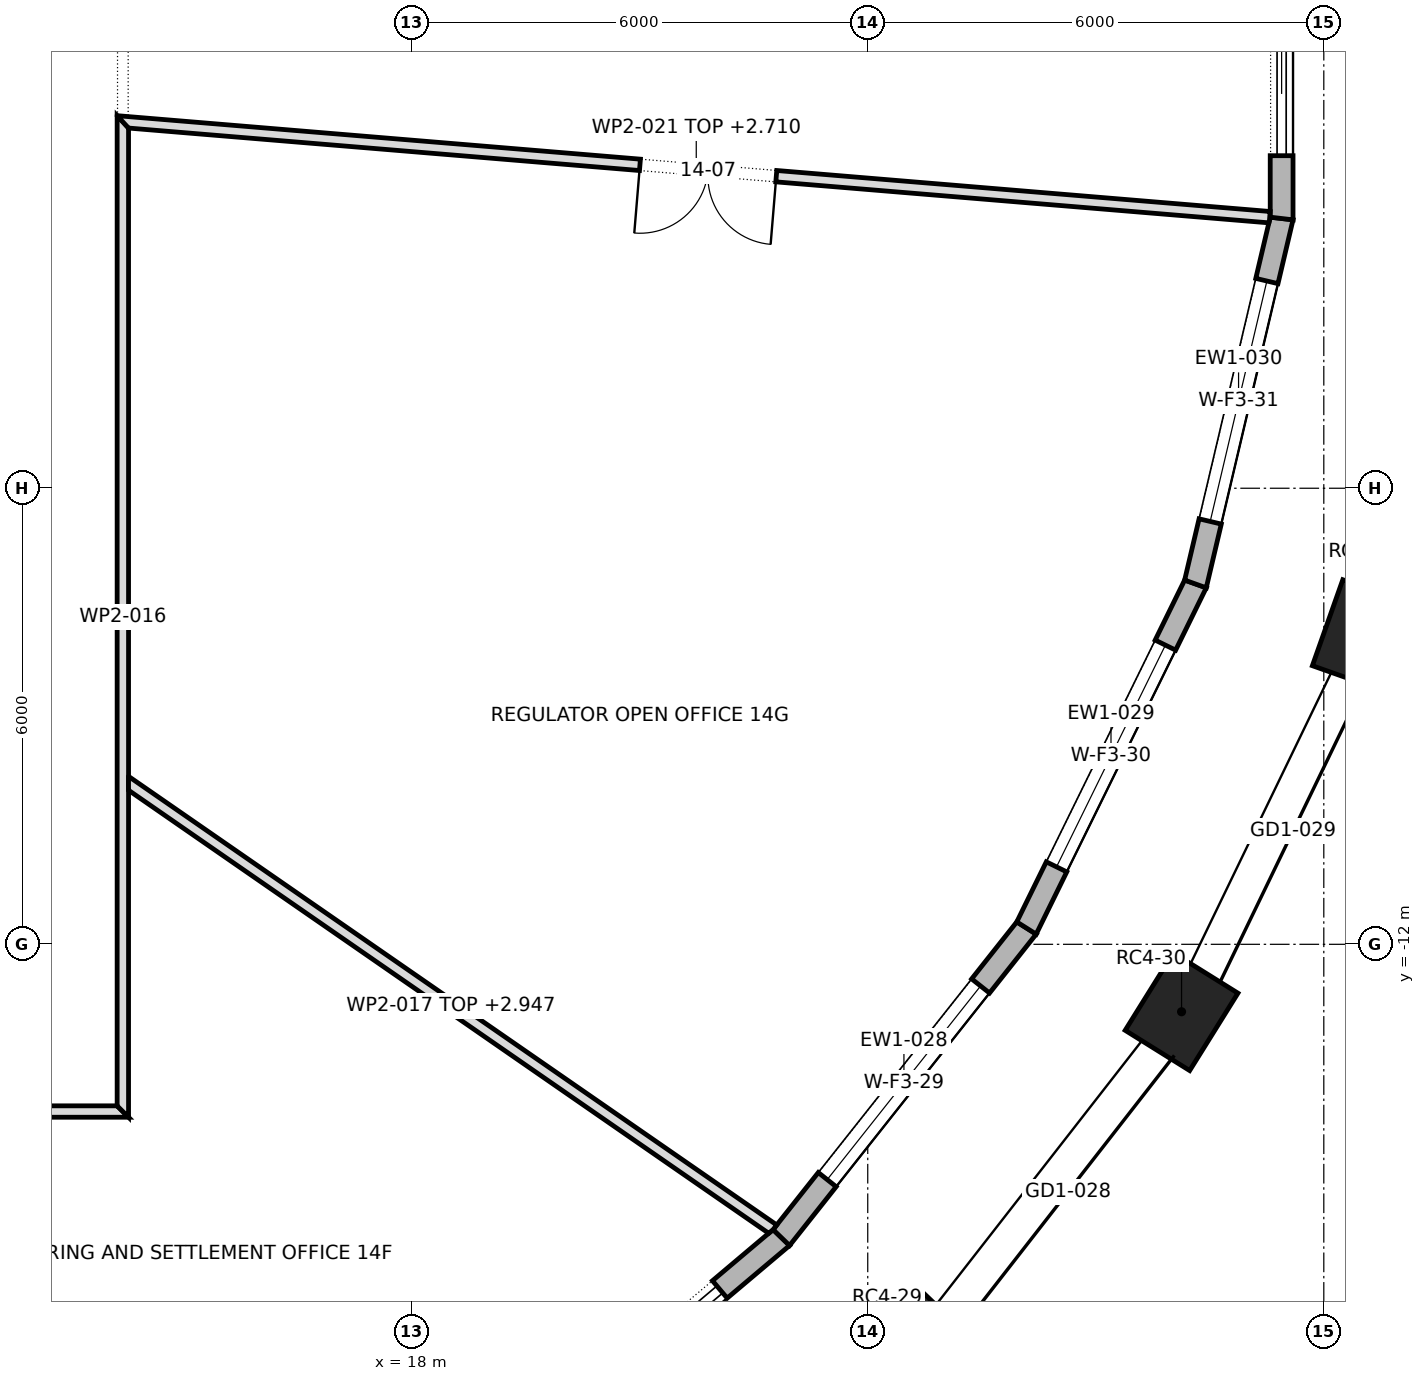
"""IFC4 building model, lengths in metres.
Left out: names, types, materials, properties, quantities, classifications, styles, units other than length and angle.
Written with IfcOpenShell. Run it as: python <this file> out.ifc"""

import sys

from ifc_helpers import new_model, si_unit, direction, frame, frame_2d, origin, origin_2d, place, context, subcontext, project, spatial, polyline, rectangle, outline, extrude, element, fill, save


model = new_model("IFC4")
c1 = context("Model", 3, precision=1e-05, world=origin(), true_north=direction((0.0, 1.0)))
c2 = subcontext(c1, "Body", "Model", "MODEL_VIEW")
j1 = project(units=[si_unit("LENGTHUNIT", "METRE"), si_unit("PLANEANGLEUNIT", "RADIAN")], contexts=[c1])
p1 = place(None, origin())
s1 = spatial("IfcSite", under=j1, at=p1, CompositionType="ELEMENT")
p2 = place(p1, origin())
s2 = spatial("IfcBuilding", under=s1, at=p2, CompositionType="ELEMENT")
p3 = place(p2, frame((0.0, 0.0, 210.9)))
s3 = spatial("IfcBuildingStorey", under=s2, at=p3, CompositionType="ELEMENT", Elevation=210.9)
for number, where, z_axis, x_axis in (
    (1, (24.655, -17.343, 0.0), (0.0, 0.0, 1.0), (0.692, 0.722, 0.0)),
    (2, (28.129, -12.887, 0.0), (0.0, 0.0, 1.0), (0.529, 0.849, 0.0)),
    (3, (30.521, -7.936, 0.0), (0.0, 0.0, 1.0), (0.334, 0.943, 0.0)),
):
    element("IfcColumn", number, at=place(p3, frame(where, z_axis=z_axis, x_axis=x_axis)), inside=s3, PredefinedType="COLUMN", context=c2, shape_type="SweptSolid", body=[
        extrude(rectangle(XDim=1.2, YDim=1.0, at=origin_2d()), origin(), (0.0, 0.0, 1.0), 4.0),
    ])
p4 = place(p3, frame((18.76, -19.319, 0.0), z_axis=(0.0, 0.0, 1.0), x_axis=(0.764386053229, 0.6447588399, 0.0)))
e4 = element("IfcWall", 4, at=p4, inside=s3, PredefinedType="STANDARD", context=c2, shape_type="SweptSolid", body=[
    extrude(outline(polyline([(-0.014, -0.15), (5.383, -0.15), (5.352, 0.15), (0.014, 0.15), (-0.014, -0.15)])), origin(), (0.0, 0.0, 1.0), 3.7),
])
p5 = place(p4, frame((1.059, 0.0, 0.0)))
e5 = element("IfcOpeningElement", 5, at=p5, cuts=e4, PredefinedType="OPENING", context=c2, shape_type="SweptSolid", body=[
    extrude(rectangle(XDim=3.25, YDim=3.25, at=frame_2d((1.625, 1.625))), frame((0.0, 0.162, 0.0), z_axis=(0.0, -1.0, 0.0), x_axis=(1.0, 0.0, 0.0)), (0.0, 0.0, 1.0), 0.324),
])
p6 = place(p3, frame((22.863, -15.858, 0.0), z_axis=(0.0, 0.0, 1.0), x_axis=(0.620870264345, 0.783913333763, 0.0)))
e6 = element("IfcWall", 6, at=p6, inside=s3, PredefinedType="STANDARD", context=c2, shape_type="SweptSolid", body=[
    extrude(outline(polyline([(-0.015, -0.15), (5.211, -0.15), (5.178, 0.15), (0.015, 0.15), (-0.015, -0.15)])), origin(), (0.0, 0.0, 1.0), 3.7),
])
p7 = place(p6, frame((0.972, 0.0, 0.6)))
e7 = element("IfcOpeningElement", 7, at=p7, cuts=e6, PredefinedType="OPENING", context=c2, shape_type="SweptSolid", body=[
    extrude(rectangle(XDim=3.25, YDim=2.65, at=frame_2d((1.625, 1.325))), frame((0.0, 0.162, 0.0), z_axis=(0.0, -1.0, 0.0), x_axis=(1.0, 0.0, 0.0)), (0.0, 0.0, 1.0), 0.324),
])
p8 = place(p3, frame((26.088, -11.786, 0.0), z_axis=(0.0, 0.0, 1.0), x_axis=(0.440773193145, 0.89761851151, 0.0)))
e8 = element("IfcWall", 8, at=p8, inside=s3, PredefinedType="STANDARD", context=c2, shape_type="SweptSolid", body=[
    extrude(outline(polyline([(-0.016, -0.15), (5.06, -0.15), (5.026, 0.15), (0.016, 0.15), (-0.016, -0.15)])), origin(), (0.0, 0.0, 1.0), 3.7),
])
p9 = place(p8, frame((0.896, 0.0, 0.6)))
e9 = element("IfcOpeningElement", 9, at=p9, cuts=e8, PredefinedType="OPENING", context=c2, shape_type="SweptSolid", body=[
    extrude(rectangle(XDim=3.25, YDim=2.65, at=frame_2d((1.625, 1.325))), frame((0.0, 0.162, 0.0), z_axis=(0.0, -1.0, 0.0), x_axis=(1.0, 0.0, 0.0)), (0.0, 0.0, 1.0), 0.324),
])
p10 = place(p3, frame((28.311, -7.259, 0.0), z_axis=(0.0, 0.0, 1.0), x_axis=(0.229535186351, 0.973300363828, 0.0)))
e10 = element("IfcWall", 10, at=p10, inside=s3, PredefinedType="STANDARD", context=c2, shape_type="SweptSolid", body=[
    extrude(outline(polyline([(-0.017, -0.15), (4.957, -0.15), (4.922, 0.15), (0.017, 0.15), (-0.017, -0.15)])), origin(), (0.0, 0.0, 1.0), 3.7),
])
p11 = place(p10, frame((0.845, 0.0, 0.6)))
e11 = element("IfcOpeningElement", 11, at=p11, cuts=e10, PredefinedType="OPENING", context=c2, shape_type="SweptSolid", body=[
    extrude(rectangle(XDim=3.25, YDim=2.65, at=frame_2d((1.625, 1.325))), frame((0.0, 0.162, 0.0), z_axis=(0.0, -1.0, 0.0), x_axis=(1.0, 0.0, 0.0)), (0.0, 0.0, 1.0), 0.324),
])
p12 = place(p3, frame((29.445, -2.451, 0.0), z_axis=(0.0, 0.0, 1.0), x_axis=(0.0, 1.0, 0.0)))
e12 = element("IfcWall", 12, at=p12, inside=s3, PredefinedType="STANDARD", context=c2, shape_type="SweptSolid", body=[
    extrude(outline(polyline([(-0.017, -0.15), (4.92, -0.15), (4.885, 0.15), (0.017, 0.15), (-0.017, -0.15)])), origin(), (0.0, 0.0, 1.0), 3.7),
])
p13 = place(p12, frame((0.826, 0.0, 0.0)))
e13 = element("IfcOpeningElement", 13, at=p13, cuts=e12, PredefinedType="OPENING", context=c2, shape_type="SweptSolid", body=[
    extrude(rectangle(XDim=3.25, YDim=3.25, at=frame_2d((1.625, 1.625))), frame((0.0, 0.162, 0.0), z_axis=(0.0, -1.0, 0.0), x_axis=(1.0, 0.0, 0.0)), (0.0, 0.0, 1.0), 0.324),
])
p14 = place(p3, frame((-14.275, -14.2, 0.0), z_axis=(0.0, 0.0, 1.0), x_axis=(1.0, 0.0, 0.0)))
e14 = element("IfcWall", 14, at=p14, inside=s3, PredefinedType="PARTITIONING", context=c2, shape_type="SweptSolid", body=[
    extrude(outline(polyline([(28.55, -0.075), (28.55, -0.075), (28.4, 0.075), (26.517, 0.075), (24.633, 0.075), (22.75, 0.075), (20.866, 0.075), (18.983, 0.075), (17.1, 0.075), (15.217, 0.075), (13.333, 0.075), (11.45, 0.075), (9.567, 0.075), (7.683, 0.075), (5.8, 0.075), (3.917, 0.075), (2.033, 0.075), (0.15, 0.075), (0.0, -0.075), (1.903, -0.075), (3.807, -0.075), (5.71, -0.075), (7.613, -0.075), (9.517, -0.075), (11.42, -0.075), (13.323, -0.075), (15.227, -0.075), (17.13, -0.075), (19.033, -0.075), (20.937, -0.075), (22.84, -0.075), (24.743, -0.075), (26.646, -0.075), (28.55, -0.075)])), origin(), (0.0, 0.0, 1.0), 3.7),
])
p15 = place(p14, frame((3.72, 0.0, 0.0)))
e15 = element("IfcOpeningElement", 15, at=p15, cuts=e14, PredefinedType="OPENING", context=c2, shape_type="SweptSolid", body=[
    extrude(rectangle(XDim=1.8, YDim=2.1, at=frame_2d((0.9, 1.05))), frame((0.0, 0.087, 0.0), z_axis=(0.0, -1.0, 0.0), x_axis=(1.0, 0.0, 0.0)), (0.0, 0.0, 1.0), 0.174),
])
p16 = place(p14, frame((13.775, 0.0, 0.0)))
e16 = element("IfcOpeningElement", 16, at=p16, cuts=e14, PredefinedType="OPENING", context=c2, shape_type="SweptSolid", body=[
    extrude(rectangle(XDim=1.0, YDim=2.1, at=frame_2d((0.5, 1.05))), frame((0.0, 0.087, 0.0), z_axis=(0.0, -1.0, 0.0), x_axis=(1.0, 0.0, 0.0)), (0.0, 0.0, 1.0), 0.174),
])
p17 = place(p14, frame((23.43, 0.0, 0.0)))
e17 = element("IfcOpeningElement", 17, at=p17, cuts=e14, PredefinedType="OPENING", context=c2, shape_type="SweptSolid", body=[
    extrude(rectangle(XDim=1.0, YDim=2.1, at=frame_2d((0.5, 1.05))), frame((0.0, 0.087, 0.0), z_axis=(0.0, -1.0, 0.0), x_axis=(1.0, 0.0, 0.0)), (0.0, 0.0, 1.0), 0.174),
])
p18 = place(p3, frame((14.2, -14.275, 0.0), z_axis=(0.0, 0.0, 1.0), x_axis=(0.0, 1.0, 0.0)))
e18 = element("IfcWall", 18, at=p18, inside=s3, PredefinedType="PARTITIONING", context=c2, shape_type="SweptSolid", body=[
    extrude(outline(polyline([(0.0, -0.075), (1.859, -0.075), (3.718, -0.075), (5.577, -0.075), (7.436, -0.075), (9.295, -0.075), (11.155, -0.075), (13.013, -0.075), (13.177, 0.075), (11.315, 0.075), (9.455, 0.075), (7.594, 0.075), (5.733, 0.075), (3.872, 0.075), (2.011, 0.075), (0.15, 0.075), (0.0, -0.075)])), origin(), (0.0, 0.0, 1.0), 3.7),
])
p19 = place(p3, frame((14.232, -9.853, 0.0), z_axis=(0.0, 0.0, 1.0), x_axis=(0.822298116352, -0.569056946047, 0.0)))
e19 = element("IfcWall", 19, at=p19, inside=s3, PredefinedType="PARTITIONING", context=c2, shape_type="SweptSolid", body=[
    extrude(outline(polyline([(0.104, -0.075), (1.811, -0.075), (3.518, -0.075), (5.225, -0.075), (6.932, -0.075), (8.639, -0.075), (10.346, -0.075), (10.366, -0.002), (10.37, 0.07), (10.37, 0.075), (8.642, 0.075), (6.914, 0.075), (5.185, 0.075), (3.457, 0.075), (1.729, 0.075), (0.0, 0.075), (0.0, 0.075), (0.104, -0.075)])), origin(), (0.0, 0.0, 1.0), 2.947),
])
p20 = place(p3, frame((29.288, -2.434, 0.0), z_axis=(0.0, 0.0, 1.0), x_axis=(-0.996562771728, 0.082841064731, 0.0)))
e20 = element("IfcWall", 20, at=p20, inside=s3, PredefinedType="PARTITIONING", context=c2, shape_type="SweptSolid", body=[
    extrude(outline(polyline([(15.222, -0.075), (15.222, -0.075), (15.14, 0.0), (15.059, 0.075), (13.177, 0.075), (11.295, 0.075), (9.414, 0.075), (7.532, 0.075), (5.65, 0.075), (3.768, 0.075), (1.886, 0.075), (0.005, 0.075), (0.0, 0.044), (0.0, -0.075), (1.903, -0.075), (3.805, -0.075), (5.708, -0.075), (7.611, -0.075), (9.514, -0.075), (11.416, -0.075), (13.319, -0.075), (15.222, -0.075)])), origin(), (0.0, 0.0, 1.0), 2.71),
])
p21 = place(p20, frame((6.514, 0.0, 0.0)))
e21 = element("IfcOpeningElement", 21, at=p21, cuts=e20, PredefinedType="OPENING", context=c2, shape_type="SweptSolid", body=[
    extrude(rectangle(XDim=1.8, YDim=2.1, at=frame_2d((0.9, 1.05))), frame((0.0, 0.087, 0.0), z_axis=(0.0, -1.0, 0.0), x_axis=(1.0, 0.0, 0.0)), (0.0, 0.0, 1.0), 0.174),
])
p22 = place(p5, origin())
e22 = element("IfcDoor", 22, at=p22, inside=s3, OperationType="DOUBLE_DOOR_SLIDING", PredefinedType="DOOR", context=c2, shape_type="SweptSolid", body=[
    extrude(rectangle(XDim=3.25, YDim=3.25, at=frame_2d((1.625, 1.625))), frame((0.0, 0.025, 0.0), z_axis=(0.0, -1.0, 0.0), x_axis=(1.0, 0.0, 0.0)), (0.0, 0.0, 1.0), 0.05),
])
fill(e5, e22)
p23 = place(p7, origin())
e23 = element("IfcWindow", 23, at=p23, inside=s3, PartitioningType="TRIPLE_PANEL_VERTICAL", PredefinedType="WINDOW", context=c2, shape_type="SweptSolid", body=[
    extrude(rectangle(XDim=3.25, YDim=2.65, at=frame_2d((1.625, 1.325))), frame((0.0, 0.03, 0.0), z_axis=(0.0, -1.0, 0.0), x_axis=(1.0, 0.0, 0.0)), (0.0, 0.0, 1.0), 0.06),
])
fill(e7, e23)
p24 = place(p9, origin())
e24 = element("IfcWindow", 24, at=p24, inside=s3, PartitioningType="TRIPLE_PANEL_VERTICAL", PredefinedType="WINDOW", context=c2, shape_type="SweptSolid", body=[
    extrude(rectangle(XDim=3.25, YDim=2.65, at=frame_2d((1.625, 1.325))), frame((0.0, 0.03, 0.0), z_axis=(0.0, -1.0, 0.0), x_axis=(1.0, 0.0, 0.0)), (0.0, 0.0, 1.0), 0.06),
])
fill(e9, e24)
p25 = place(p11, origin())
e25 = element("IfcWindow", 25, at=p25, inside=s3, PartitioningType="TRIPLE_PANEL_VERTICAL", PredefinedType="WINDOW", context=c2, shape_type="SweptSolid", body=[
    extrude(rectangle(XDim=3.25, YDim=2.65, at=frame_2d((1.625, 1.325))), frame((0.0, 0.03, 0.0), z_axis=(0.0, -1.0, 0.0), x_axis=(1.0, 0.0, 0.0)), (0.0, 0.0, 1.0), 0.06),
])
fill(e11, e25)
p26 = place(p13, origin())
e26 = element("IfcDoor", 26, at=p26, inside=s3, OperationType="DOUBLE_DOOR_SLIDING", PredefinedType="DOOR", context=c2, shape_type="SweptSolid", body=[
    extrude(rectangle(XDim=3.25, YDim=3.25, at=frame_2d((1.625, 1.625))), frame((0.0, 0.025, 0.0), z_axis=(0.0, -1.0, 0.0), x_axis=(1.0, 0.0, 0.0)), (0.0, 0.0, 1.0), 0.05),
])
fill(e13, e26)
p27 = place(p21, origin())
e27 = element("IfcDoor", 27, at=p27, inside=s3, OperationType="DOUBLE_DOOR_SINGLE_SWING", PredefinedType="DOOR", context=c2, shape_type="SweptSolid", body=[
    extrude(rectangle(XDim=1.8, YDim=2.1, at=frame_2d((0.9, 1.05))), frame((0.0, 0.025, 0.0), z_axis=(0.0, -1.0, 0.0), x_axis=(1.0, 0.0, 0.0)), (0.0, 0.0, 1.0), 0.05),
])
fill(e21, e27)
save(model, sys.argv[1])
